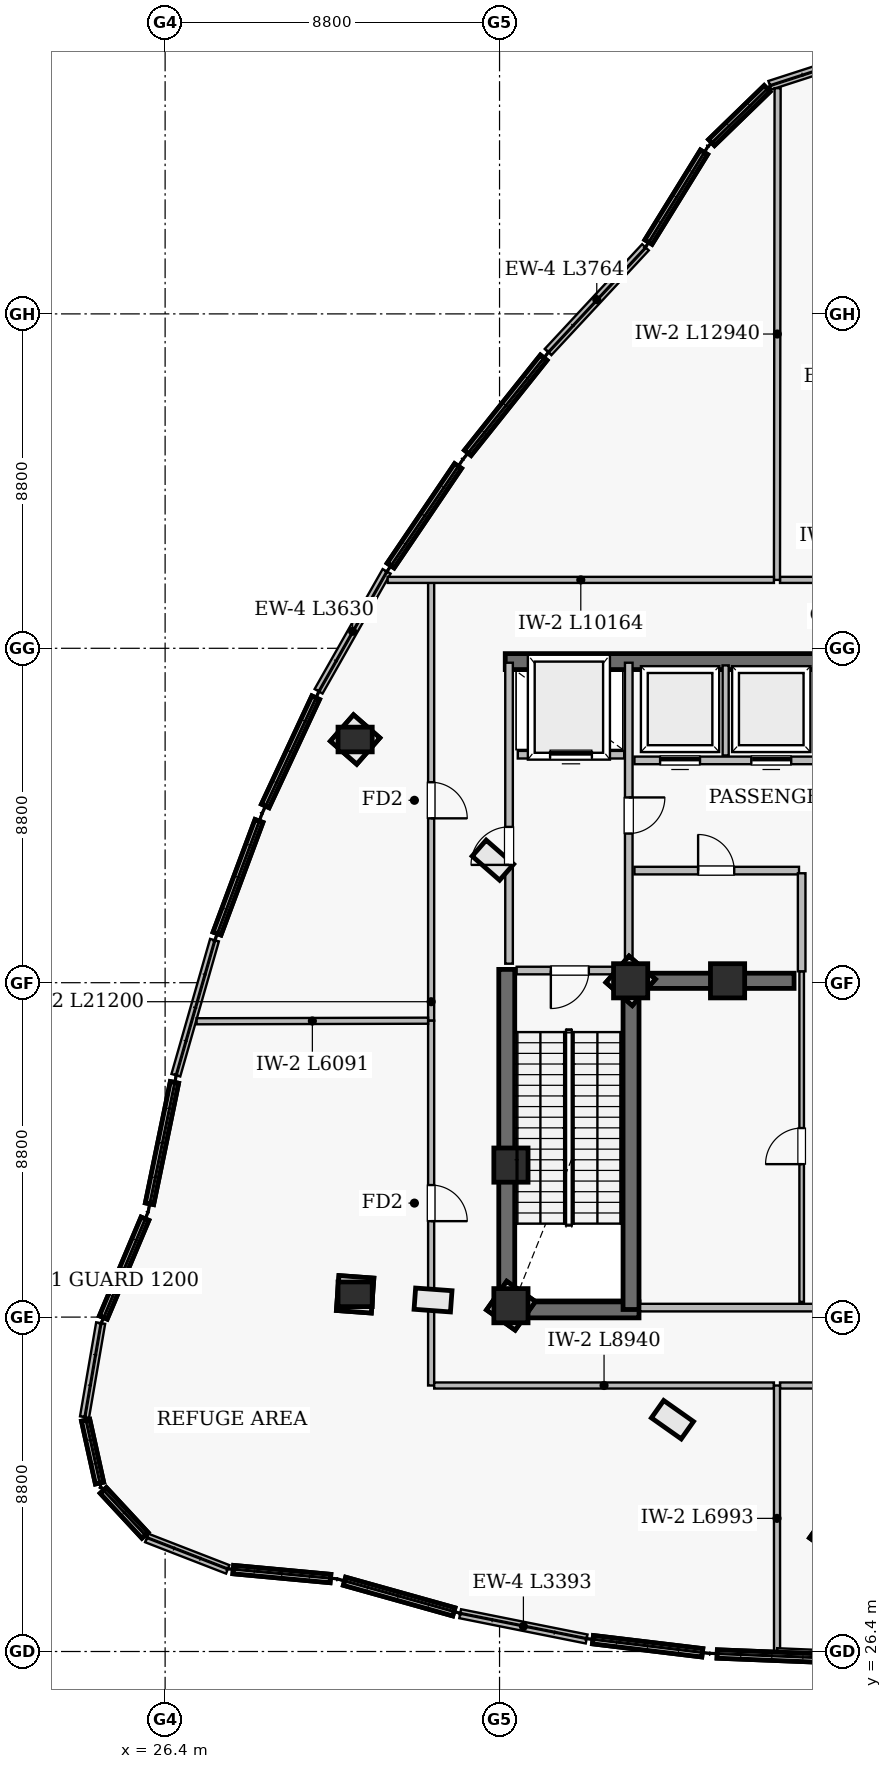
"""IFC4 building model, lengths in metres.
Left out: names, types, materials, properties, quantities, classifications, styles, units other than length and angle.
Written with IfcOpenShell. Run it as: python <this file> out.ifc"""

import sys

from ifc_helpers import new_model, si_unit, direction, frame, frame_2d, origin, origin_2d, place, context, subcontext, project, spatial, rectangle, extrude, element, fill, save


model = new_model("IFC4")
c1 = context("Model", 3, precision=1e-05, world=origin(), true_north=direction((0.0, 1.0)))
c2 = subcontext(c1, "Body", "Model", "MODEL_VIEW")
j1 = project(units=[si_unit("LENGTHUNIT", "METRE"), si_unit("PLANEANGLEUNIT", "RADIAN")], contexts=[c1])
p1 = place(None, origin())
s1 = spatial("IfcSite", under=j1, at=p1, CompositionType="ELEMENT")
p2 = place(p1, origin())
s2 = spatial("IfcBuilding", under=s1, at=p2, CompositionType="ELEMENT")
p3 = place(p2, frame((0.0, 0.0, 282.8)))
s3 = spatial("IfcBuildingStorey", under=s2, at=p3, CompositionType="ELEMENT", Elevation=282.8)
p4 = place(p3, frame((35.35, 52.45, 0.0), z_axis=(0.0, 0.0, 1.0), x_axis=(1.0, 0.0, 0.0)))
e1 = element("IfcWall", 1, at=p4, inside=s3, PredefinedType="SHEAR", context=c2, shape_type="SweptSolid", body=[
    extrude(rectangle(XDim=17.3, YDim=0.42, at=frame_2d((8.65, 0.0))), origin(), (0.0, 0.0, 1.0), 6.51),
])
p5 = place(p3, frame((35.18, 35.39, 0.0), z_axis=(0.0, 0.0, 1.0), x_axis=(1.0, 0.0, 0.0)))
e2 = element("IfcWall", 2, at=p5, inside=s3, PredefinedType="SHEAR", context=c2, shape_type="SweptSolid", body=[
    extrude(rectangle(XDim=3.69, YDim=0.42, at=frame_2d((1.845, 0.0))), origin(), (0.0, 0.0, 1.0), 6.51),
])
p6 = place(p3, frame((35.39, 35.18, 0.0), z_axis=(0.0, 0.0, 1.0), x_axis=(0.0, 1.0, 0.0)))
e3 = element("IfcWall", 3, at=p6, inside=s3, PredefinedType="SHEAR", context=c2, shape_type="SweptSolid", body=[
    extrude(rectangle(XDim=9.17, YDim=0.42, at=frame_2d((4.585, 0.0))), origin(), (0.0, 0.0, 1.0), 6.51),
])
p7 = place(p3, frame((38.66, 35.4, 0.0), z_axis=(0.0, 0.0, 1.0), x_axis=(0.0, 1.0, 0.0)))
e4 = element("IfcWall", 4, at=p7, inside=s3, PredefinedType="SHEAR", context=c2, shape_type="SweptSolid", body=[
    extrude(rectangle(XDim=8.95, YDim=0.42, at=frame_2d((4.475, 0.0))), origin(), (0.0, 0.0, 1.0), 6.51),
])
p8 = place(p3, frame((38.75, 44.05, 0.0), z_axis=(0.0, 0.0, 1.0), x_axis=(1.0, 0.0, 0.0)))
e5 = element("IfcWall", 5, at=p8, inside=s3, PredefinedType="SHEAR", context=c2, shape_type="SweptSolid", body=[
    extrude(rectangle(XDim=4.2, YDim=0.4, at=frame_2d((2.1, 0.0))), origin(), (0.0, 0.0, 1.0), 6.51),
])
for number, where, z_axis, x_axis in (
    (6, (35.5, 35.5, 0.0), (0.0, 0.0, 1.0), (1.0, 0.0, 0.0)),
    (7, (38.65, 44.05, 0.0), (0.0, 0.0, 1.0), (1.0, 0.0, 0.0)),
    (8, (35.5, 39.2, 0.0), (0.0, 0.0, 1.0), (1.0, 0.0, 0.0)),
    (9, (41.2, 44.05, 0.0), (0.0, 0.0, 1.0), (1.0, 0.0, 0.0)),
):
    element("IfcColumn", number, at=place(p3, frame(where, z_axis=z_axis, x_axis=x_axis)), inside=s3, PredefinedType="COLUMN", context=c2, shape_type="SweptSolid", body=[
        extrude(rectangle(XDim=0.9, YDim=0.9, at=origin_2d()), origin(), (0.0, 0.0, 1.0), 6.8),
    ])
for number, where, z_axis, x_axis in (
    (10, (31.4, 35.8, 0.0), (0.0, 0.0, 1.0), (1.0, 0.0, 0.0)),
    (11, (31.4, 50.4, 0.0), (0.0, 0.0, 1.0), (1.0, 0.0, 0.0)),
):
    element("IfcColumn", number, at=place(p3, frame(where, z_axis=z_axis, x_axis=x_axis)), inside=s3, PredefinedType="COLUMN", context=c2, shape_type="SweptSolid", body=[
        extrude(rectangle(XDim=0.9, YDim=0.65, at=origin_2d()), origin(), (0.0, 0.0, 1.0), 6.8),
    ])
p9 = place(p3, frame((44.029, 68.17, 0.0), z_axis=(0.0, 0.0, 1.0), x_axis=(-0.951512079285, -0.307611383039, 0.0)))
e12 = element("IfcWall", 12, at=p9, inside=s3, PredefinedType="SOLIDWALL", context=c2, shape_type="SweptSolid", body=[
    extrude(rectangle(XDim=1.805, YDim=0.24, at=frame_2d((0.902, 0.0))), origin(), (0.0, 0.0, 1.0), 6.51),
])
p10 = place(p3, frame((39.04, 63.353, 0.0), z_axis=(0.0, 0.0, 1.0), x_axis=(-0.680856477384, -0.732416860268, 0.0)))
e13 = element("IfcWall", 13, at=p10, inside=s3, PredefinedType="SOLIDWALL", context=c2, shape_type="SweptSolid", body=[
    extrude(rectangle(XDim=3.764, YDim=0.24, at=frame_2d((1.882, 0.0))), origin(), (0.0, 0.0, 1.0), 6.51),
])
p11 = place(p3, frame((32.229, 54.825, 0.0), z_axis=(0.0, 0.0, 1.0), x_axis=(-0.493333269889, -0.869840378932, 0.0)))
e14 = element("IfcWall", 14, at=p11, inside=s3, PredefinedType="SOLIDWALL", context=c2, shape_type="SweptSolid", body=[
    extrude(rectangle(XDim=3.63, YDim=0.24, at=frame_2d((1.815, 0.0))), origin(), (0.0, 0.0, 1.0), 6.51),
])
p12 = place(p3, frame((27.699, 45.12, 0.0), z_axis=(0.0, 0.0, 1.0), x_axis=(-0.27493040994, -0.961464128135, 0.0)))
e15 = element("IfcWall", 15, at=p12, inside=s3, PredefinedType="SOLIDWALL", context=c2, shape_type="SweptSolid", body=[
    extrude(rectangle(XDim=3.698, YDim=0.24, at=frame_2d((1.849, 0.0))), origin(), (0.0, 0.0, 1.0), 6.51),
])
p13 = place(p3, frame((24.704, 35.043, 0.0), z_axis=(0.0, 0.0, 1.0), x_axis=(-0.169379410238, -0.985550919733, 0.0)))
e16 = element("IfcWall", 16, at=p13, inside=s3, PredefinedType="SOLIDWALL", context=c2, shape_type="SweptSolid", body=[
    extrude(rectangle(XDim=2.511, YDim=0.24, at=frame_2d((1.255, 0.0))), origin(), (0.0, 0.0, 1.0), 6.51),
])
p14 = place(p3, frame((25.916, 29.388, 0.0), z_axis=(0.0, 0.0, 1.0), x_axis=(0.932278998154, -0.361740058053, 0.0)))
e17 = element("IfcWall", 17, at=p14, inside=s3, PredefinedType="SOLIDWALL", context=c2, shape_type="SweptSolid", body=[
    extrude(rectangle(XDim=2.286, YDim=0.24, at=frame_2d((1.143, 0.0))), origin(), (0.0, 0.0, 1.0), 6.51),
])
p15 = place(p3, frame((34.164, 27.395, 0.0), z_axis=(0.0, 0.0, 1.0), x_axis=(0.980580675691, -0.196116135138, 0.0)))
e18 = element("IfcWall", 18, at=p15, inside=s3, PredefinedType="SOLIDWALL", context=c2, shape_type="SweptSolid", body=[
    extrude(rectangle(XDim=3.394, YDim=0.24, at=frame_2d((1.697, 0.0))), origin(), (0.0, 0.0, 1.0), 6.51),
])
p16 = place(p3, frame((42.58, 33.4, 0.0), z_axis=(0.0, 0.0, 1.0), x_axis=(1.0, 0.0, 0.0)))
e19 = element("IfcWall", 19, at=p16, inside=s3, PredefinedType="SOLIDWALL", context=c2, shape_type="SweptSolid", body=[
    extrude(rectangle(XDim=11.94, YDim=0.16, at=frame_2d((5.97, 0.0))), origin(), (0.0, 0.0, 1.0), 5.798),
])
p17 = place(p16, frame((5.495, 0.0, 0.0)))
e20 = element("IfcOpeningElement", 20, at=p17, cuts=e19, PredefinedType="OPENING", context=c2, shape_type="SweptSolid", body=[
    extrude(rectangle(XDim=0.95, YDim=2.15, at=frame_2d((0.475, 1.075))), frame((0.0, 0.09, 0.0), z_axis=(0.0, -1.0, 0.0), x_axis=(1.0, 0.0, 0.0)), (0.0, 0.0, 1.0), 0.18),
])
p18 = place(p3, frame((33.4, 54.6, 0.0), z_axis=(0.0, 0.0, 1.0), x_axis=(0.0, -1.0, 0.0)))
e21 = element("IfcWall", 21, at=p18, inside=s3, PredefinedType="SOLIDWALL", context=c2, shape_type="SweptSolid", body=[
    extrude(rectangle(XDim=11.6, YDim=0.16, at=frame_2d((5.8, 0.0))), origin(), (0.0, 0.0, 1.0), 5.748),
])
p19 = place(p18, frame((5.325, 0.0, 0.0)))
e22 = element("IfcOpeningElement", 22, at=p19, cuts=e21, PredefinedType="OPENING", context=c2, shape_type="SweptSolid", body=[
    extrude(rectangle(XDim=0.95, YDim=2.15, at=frame_2d((0.475, 1.075))), frame((0.0, 0.09, 0.0), z_axis=(0.0, -1.0, 0.0), x_axis=(1.0, 0.0, 0.0)), (0.0, 0.0, 1.0), 0.18),
])
p20 = place(p3, frame((38.9, 35.45, 0.0), z_axis=(0.0, 0.0, 1.0), x_axis=(1.0, 0.0, 0.0)))
e23 = element("IfcWall", 23, at=p20, inside=s3, PredefinedType="SOLIDWALL", context=c2, shape_type="SweptSolid", body=[
    extrude(rectangle(XDim=10.2, YDim=0.2, at=frame_2d((5.1, 0.0))), origin(), (0.0, 0.0, 1.0), 6.51),
])
p21 = place(p20, frame((4.6, 0.0, 0.0)))
e24 = element("IfcOpeningElement", 24, at=p21, cuts=e23, PredefinedType="OPENING", context=c2, shape_type="SweptSolid", body=[
    extrude(rectangle(XDim=1.0, YDim=2.15, at=frame_2d((0.5, 1.075))), frame((0.0, 0.11, 0.0), z_axis=(0.0, -1.0, 0.0), x_axis=(1.0, 0.0, 0.0)), (0.0, 0.0, 1.0), 0.22),
])
p22 = place(p3, frame((52.47, 54.6, 0.0), z_axis=(0.0, 0.0, 1.0), x_axis=(-1.0, 0.0, 0.0)))
e25 = element("IfcWall", 25, at=p22, inside=s3, PredefinedType="SOLIDWALL", context=c2, shape_type="SweptSolid", body=[
    extrude(rectangle(XDim=9.89, YDim=0.16, at=frame_2d((4.945, 0.0))), origin(), (0.0, 0.0, 1.0), 5.798),
])
p23 = place(p22, frame((4.47, 0.0, 0.0)))
e26 = element("IfcOpeningElement", 26, at=p23, cuts=e25, PredefinedType="OPENING", context=c2, shape_type="SweptSolid", body=[
    extrude(rectangle(XDim=0.95, YDim=2.15, at=frame_2d((0.475, 1.075))), frame((0.0, 0.09, 0.0), z_axis=(0.0, -1.0, 0.0), x_axis=(1.0, 0.0, 0.0)), (0.0, 0.0, 1.0), 0.18),
])
p24 = place(p3, frame((33.4, 43.0, 0.0), z_axis=(0.0, 0.0, 1.0), x_axis=(0.0, -1.0, 0.0)))
e27 = element("IfcWall", 27, at=p24, inside=s3, PredefinedType="SOLIDWALL", context=c2, shape_type="SweptSolid", body=[
    extrude(rectangle(XDim=9.6, YDim=0.16, at=frame_2d((4.8, 0.0))), origin(), (0.0, 0.0, 1.0), 5.798),
])
p25 = place(p24, frame((4.325, 0.0, 0.0)))
e28 = element("IfcOpeningElement", 28, at=p25, cuts=e27, PredefinedType="OPENING", context=c2, shape_type="SweptSolid", body=[
    extrude(rectangle(XDim=0.95, YDim=2.15, at=frame_2d((0.475, 1.075))), frame((0.0, 0.09, 0.0), z_axis=(0.0, -1.0, 0.0), x_axis=(1.0, 0.0, 0.0)), (0.0, 0.0, 1.0), 0.18),
])
p26 = place(p3, frame((43.15, 35.6, 0.0), z_axis=(0.0, 0.0, 1.0), x_axis=(0.0, 1.0, 0.0)))
e29 = element("IfcWall", 29, at=p26, inside=s3, PredefinedType="PARTITIONING", context=c2, shape_type="SweptSolid", body=[
    extrude(rectangle(XDim=8.7, YDim=0.12, at=frame_2d((4.35, 0.0))), origin(), (0.0, 0.0, 1.0), 6.51),
])
p27 = place(p26, frame((3.625, 0.0, 0.0)))
e30 = element("IfcOpeningElement", 30, at=p27, cuts=e29, PredefinedType="OPENING", context=c2, shape_type="SweptSolid", body=[
    extrude(rectangle(XDim=0.95, YDim=2.1, at=frame_2d((0.475, 1.05))), frame((0.0, 0.07, 0.0), z_axis=(0.0, -1.0, 0.0), x_axis=(1.0, 0.0, 0.0)), (0.0, 0.0, 1.0), 0.14),
])
p28 = place(p3, frame((35.45, 44.5, 0.0), z_axis=(0.0, 0.0, 1.0), x_axis=(0.0, 1.0, 0.0)))
e31 = element("IfcWall", 31, at=p28, inside=s3, PredefinedType="SOLIDWALL", context=c2, shape_type="SweptSolid", body=[
    extrude(rectangle(XDim=7.92, YDim=0.2, at=frame_2d((3.96, 0.0))), origin(), (0.0, 0.0, 1.0), 6.51),
])
p29 = place(p28, frame((2.6, 0.0, 0.0)))
e32 = element("IfcOpeningElement", 32, at=p29, cuts=e31, PredefinedType="OPENING", context=c2, shape_type="SweptSolid", body=[
    extrude(rectangle(XDim=1.0, YDim=2.15, at=frame_2d((0.5, 1.075))), frame((0.0, 0.11, 0.0), z_axis=(0.0, -1.0, 0.0), x_axis=(1.0, 0.0, 0.0)), (0.0, 0.0, 1.0), 0.22),
])
p30 = place(p3, frame((38.6, 44.5, 0.0), z_axis=(0.0, 0.0, 1.0), x_axis=(0.0, 1.0, 0.0)))
e33 = element("IfcWall", 33, at=p30, inside=s3, PredefinedType="SOLIDWALL", context=c2, shape_type="SweptSolid", body=[
    extrude(rectangle(XDim=7.92, YDim=0.2, at=frame_2d((3.96, 0.0))), origin(), (0.0, 0.0, 1.0), 6.51),
])
p31 = place(p30, frame((3.425, 0.0, 0.0)))
e34 = element("IfcOpeningElement", 34, at=p31, cuts=e33, PredefinedType="OPENING", context=c2, shape_type="SweptSolid", body=[
    extrude(rectangle(XDim=0.95, YDim=2.15, at=frame_2d((0.475, 1.075))), frame((0.0, 0.11, 0.0), z_axis=(0.0, -1.0, 0.0), x_axis=(1.0, 0.0, 0.0)), (0.0, 0.0, 1.0), 0.22),
])
p32 = place(p3, frame((38.75, 49.85, 0.0), z_axis=(0.0, 0.0, 1.0), x_axis=(1.0, 0.0, 0.0)))
e35 = element("IfcWall", 35, at=p32, inside=s3, PredefinedType="SOLIDWALL", context=c2, shape_type="SweptSolid", body=[
    extrude(rectangle(XDim=5.5, YDim=0.2, at=frame_2d((2.75, 0.0))), origin(), (0.0, 0.0, 1.0), 6.51),
])
p33 = place(p32, frame((0.675, 0.0, 0.0)))
e36 = element("IfcOpeningElement", 36, at=p33, cuts=e35, PredefinedType="OPENING", context=c2, shape_type="SweptSolid", body=[
    extrude(rectangle(XDim=1.05, YDim=2.15, at=frame_2d((0.525, 1.075))), frame((0.0, 0.11, 0.0), z_axis=(0.0, -1.0, 0.0), x_axis=(1.0, 0.0, 0.0)), (0.0, 0.0, 1.0), 0.22),
])
p34 = place(p32, frame((3.075, 0.0, 0.0)))
e37 = element("IfcOpeningElement", 37, at=p34, cuts=e35, PredefinedType="OPENING", context=c2, shape_type="SweptSolid", body=[
    extrude(rectangle(XDim=1.05, YDim=2.15, at=frame_2d((0.525, 1.075))), frame((0.0, 0.11, 0.0), z_axis=(0.0, -1.0, 0.0), x_axis=(1.0, 0.0, 0.0)), (0.0, 0.0, 1.0), 0.22),
])
p35 = place(p3, frame((38.75, 46.95, 0.0), z_axis=(0.0, 0.0, 1.0), x_axis=(1.0, 0.0, 0.0)))
e38 = element("IfcWall", 38, at=p35, inside=s3, PredefinedType="SOLIDWALL", context=c2, shape_type="SweptSolid", body=[
    extrude(rectangle(XDim=4.33, YDim=0.2, at=frame_2d((2.165, 0.0))), origin(), (0.0, 0.0, 1.0), 6.51),
])
p36 = place(p35, frame((1.675, 0.0, 0.0)))
e39 = element("IfcOpeningElement", 39, at=p36, cuts=e38, PredefinedType="OPENING", context=c2, shape_type="SweptSolid", body=[
    extrude(rectangle(XDim=0.95, YDim=2.1, at=frame_2d((0.475, 1.05))), frame((0.0, 0.11, 0.0), z_axis=(0.0, -1.0, 0.0), x_axis=(1.0, 0.0, 0.0)), (0.0, 0.0, 1.0), 0.22),
])
p37 = place(p3, frame((35.65, 44.32, 0.0), z_axis=(0.0, 0.0, 1.0), x_axis=(1.0, 0.0, 0.0)))
e40 = element("IfcWall", 40, at=p37, inside=s3, PredefinedType="SOLIDWALL", context=c2, shape_type="SweptSolid", body=[
    extrude(rectangle(XDim=2.8, YDim=0.2, at=frame_2d((1.4, 0.0))), origin(), (0.0, 0.0, 1.0), 6.51),
])
p38 = place(p37, frame((0.9, 0.0, 0.0)))
e41 = element("IfcOpeningElement", 41, at=p38, cuts=e40, PredefinedType="OPENING", context=c2, shape_type="SweptSolid", body=[
    extrude(rectangle(XDim=1.0, YDim=2.15, at=frame_2d((0.5, 1.075))), frame((0.0, 0.11, 0.0), z_axis=(0.0, -1.0, 0.0), x_axis=(1.0, 0.0, 0.0)), (0.0, 0.0, 1.0), 0.22),
])
p39 = place(p3, frame((35.68, 50.0, 0.0), z_axis=(0.0, 0.0, 1.0), x_axis=(1.0, 0.0, 0.0)))
e42 = element("IfcWall", 42, at=p39, inside=s3, PredefinedType="SOLIDWALL", context=c2, shape_type="SweptSolid", body=[
    extrude(rectangle(XDim=2.8, YDim=0.2, at=frame_2d((1.4, 0.0))), origin(), (0.0, 0.0, 1.0), 6.51),
])
p40 = place(p39, frame((0.85, 0.0, 0.0)))
e43 = element("IfcOpeningElement", 43, at=p40, cuts=e42, PredefinedType="OPENING", context=c2, shape_type="SweptSolid", body=[
    extrude(rectangle(XDim=1.1, YDim=2.15, at=frame_2d((0.55, 1.075))), frame((0.0, 0.11, 0.0), z_axis=(0.0, -1.0, 0.0), x_axis=(1.0, 0.0, 0.0)), (0.0, 0.0, 1.0), 0.22),
])
p41 = place(p3, frame((42.5, 54.6, 0.0), z_axis=(0.0, 0.0, 1.0), x_axis=(0.001320703727, 0.99999912787, 0.0)))
e44 = element("IfcWall", 44, at=p41, inside=s3, PredefinedType="SOLIDWALL", context=c2, shape_type="SweptSolid", body=[
    extrude(rectangle(XDim=12.94, YDim=0.16, at=frame_2d((6.47, 0.0))), origin(), (0.0, 0.0, 1.0), 5.798),
])
p42 = place(p3, frame((42.42, 54.6, 0.0), z_axis=(0.0, 0.0, 1.0), x_axis=(-1.0, 0.0, 0.0)))
e45 = element("IfcWall", 45, at=p42, inside=s3, PredefinedType="SOLIDWALL", context=c2, shape_type="SweptSolid", body=[
    extrude(rectangle(XDim=10.164, YDim=0.16, at=frame_2d((5.082, 0.0))), origin(), (0.0, 0.0, 1.0), 5.798),
])
p43 = place(p3, frame((33.48, 33.4, 0.0), z_axis=(0.0, 0.0, 1.0), x_axis=(1.0, 0.0, 0.0)))
e46 = element("IfcWall", 46, at=p43, inside=s3, PredefinedType="SOLIDWALL", context=c2, shape_type="SweptSolid", body=[
    extrude(rectangle(XDim=8.94, YDim=0.16, at=frame_2d((4.47, 0.0))), origin(), (0.0, 0.0, 1.0), 5.798),
])
p44 = place(p3, frame((42.502, 26.407, 0.0), z_axis=(0.0, 0.0, 1.0), x_axis=(-0.000279300342, 0.999999960996, 0.0)))
e47 = element("IfcWall", 47, at=p44, inside=s3, PredefinedType="SOLIDWALL", context=c2, shape_type="SweptSolid", body=[
    extrude(rectangle(XDim=6.993, YDim=0.16, at=frame_2d((3.497, 0.0))), origin(), (0.0, 0.0, 1.0), 5.798),
])
p45 = place(p3, frame((33.32, 43.0, 0.0), z_axis=(0.0, 0.0, 1.0), x_axis=(-0.999997011031, -0.002444980467, 0.0)))
e48 = element("IfcWall", 48, at=p45, inside=s3, PredefinedType="SOLIDWALL", context=c2, shape_type="SweptSolid", body=[
    extrude(rectangle(XDim=6.091, YDim=0.16, at=frame_2d((3.045, 0.0))), origin(), (0.0, 0.0, 1.0), 5.798),
])
p46 = place(p3, frame((43.15, 44.3, 0.0), z_axis=(0.0, 0.0, 1.0), x_axis=(0.0, 1.0, 0.0)))
e49 = element("IfcWall", 49, at=p46, inside=s3, PredefinedType="SOLIDWALL", context=c2, shape_type="SweptSolid", body=[
    extrude(rectangle(XDim=2.58, YDim=0.2, at=frame_2d((1.29, 0.0))), origin(), (0.0, 0.0, 1.0), 6.51),
])
p47 = place(p3, frame((41.15, 49.98, 0.0), z_axis=(0.0, 0.0, 1.0), x_axis=(0.0, 1.0, 0.0)))
e50 = element("IfcWall", 50, at=p47, inside=s3, PredefinedType="SOLIDWALL", context=c2, shape_type="SweptSolid", body=[
    extrude(rectangle(XDim=2.37, YDim=0.16, at=frame_2d((1.185, 0.0))), origin(), (0.0, 0.0, 1.0), 6.51),
])
p48 = place(p3, frame((42.502, 26.407, 0.0), z_axis=(0.0, 0.0, 1.0), x_axis=(0.999108795234, -0.042209184862, 0.0)))
e51 = element("IfcWall", 51, at=p48, inside=s3, PredefinedType="SOLIDWALL", context=c2, shape_type="SweptSolid", body=[
    extrude(rectangle(XDim=1.544, YDim=0.16, at=frame_2d((0.772, 0.0))), origin(), (0.0, 0.0, 1.0), 6.51),
])
p49 = place(p38, frame((1.0, 0.0, 0.0), z_axis=(0.0, 0.0, 1.0), x_axis=(-1.0, 0.0, 0.0)))
e52 = element("IfcDoor", 52, at=p49, inside=s3, OperationType="SINGLE_SWING_LEFT", PredefinedType="DOOR", context=c2, shape_type="SweptSolid", body=[
    extrude(rectangle(XDim=1.0, YDim=2.15, at=frame_2d((0.5, 1.075))), frame((0.0, 0.025, 0.0), z_axis=(0.0, -1.0, 0.0), x_axis=(1.0, 0.0, 0.0)), (0.0, 0.0, 1.0), 0.05),
])
fill(e41, e52)
p50 = place(p29, origin())
e53 = element("IfcDoor", 53, at=p50, inside=s3, OperationType="SINGLE_SWING_LEFT", PredefinedType="DOOR", context=c2, shape_type="SweptSolid", body=[
    extrude(rectangle(XDim=1.0, YDim=2.15, at=frame_2d((0.5, 1.075))), frame((0.0, 0.025, 0.0), z_axis=(0.0, -1.0, 0.0), x_axis=(1.0, 0.0, 0.0)), (0.0, 0.0, 1.0), 0.05),
])
fill(e32, e53)
p51 = place(p31, frame((0.95, 0.0, 0.0), z_axis=(0.0, 0.0, 1.0), x_axis=(-1.0, 0.0, 0.0)))
e54 = element("IfcDoor", 54, at=p51, inside=s3, OperationType="SINGLE_SWING_RIGHT", PredefinedType="DOOR", context=c2, shape_type="SweptSolid", body=[
    extrude(rectangle(XDim=0.95, YDim=2.15, at=frame_2d((0.475, 1.075))), frame((0.0, 0.025, 0.0), z_axis=(0.0, -1.0, 0.0), x_axis=(1.0, 0.0, 0.0)), (0.0, 0.0, 1.0), 0.05),
])
fill(e34, e54)
p52 = place(p40, origin())
e55 = element("IfcDoor", 55, at=p52, inside=s3, OperationType="SLIDING_TO_LEFT", PredefinedType="DOOR", context=c2, shape_type="SweptSolid", body=[
    extrude(rectangle(XDim=1.1, YDim=2.15, at=frame_2d((0.55, 1.075))), frame((0.0, 0.025, 0.0), z_axis=(0.0, -1.0, 0.0), x_axis=(1.0, 0.0, 0.0)), (0.0, 0.0, 1.0), 0.05),
])
fill(e43, e55)
p53 = place(p33, origin())
e56 = element("IfcDoor", 56, at=p53, inside=s3, OperationType="SLIDING_TO_LEFT", PredefinedType="DOOR", context=c2, shape_type="SweptSolid", body=[
    extrude(rectangle(XDim=1.05, YDim=2.15, at=frame_2d((0.525, 1.075))), frame((0.0, 0.025, 0.0), z_axis=(0.0, -1.0, 0.0), x_axis=(1.0, 0.0, 0.0)), (0.0, 0.0, 1.0), 0.05),
])
fill(e36, e56)
p54 = place(p34, origin())
e57 = element("IfcDoor", 57, at=p54, inside=s3, OperationType="SLIDING_TO_LEFT", PredefinedType="DOOR", context=c2, shape_type="SweptSolid", body=[
    extrude(rectangle(XDim=1.05, YDim=2.15, at=frame_2d((0.525, 1.075))), frame((0.0, 0.025, 0.0), z_axis=(0.0, -1.0, 0.0), x_axis=(1.0, 0.0, 0.0)), (0.0, 0.0, 1.0), 0.05),
])
fill(e37, e57)
p55 = place(p36, origin())
e58 = element("IfcDoor", 58, at=p55, inside=s3, OperationType="SINGLE_SWING_LEFT", PredefinedType="DOOR", context=c2, shape_type="SweptSolid", body=[
    extrude(rectangle(XDim=0.95, YDim=2.1, at=frame_2d((0.475, 1.05))), frame((0.0, 0.025, 0.0), z_axis=(0.0, -1.0, 0.0), x_axis=(1.0, 0.0, 0.0)), (0.0, 0.0, 1.0), 0.05),
])
fill(e39, e58)
p56 = place(p27, origin())
e59 = element("IfcDoor", 59, at=p56, inside=s3, OperationType="SINGLE_SWING_LEFT", PredefinedType="DOOR", context=c2, shape_type="SweptSolid", body=[
    extrude(rectangle(XDim=0.95, YDim=2.1, at=frame_2d((0.475, 1.05))), frame((0.0, 0.025, 0.0), z_axis=(0.0, -1.0, 0.0), x_axis=(1.0, 0.0, 0.0)), (0.0, 0.0, 1.0), 0.05),
])
fill(e30, e59)
p57 = place(p25, origin())
e60 = element("IfcDoor", 60, at=p57, inside=s3, OperationType="SINGLE_SWING_RIGHT", PredefinedType="DOOR", context=c2, shape_type="SweptSolid", body=[
    extrude(rectangle(XDim=0.95, YDim=2.15, at=frame_2d((0.475, 1.075))), frame((0.0, 0.025, 0.0), z_axis=(0.0, -1.0, 0.0), x_axis=(1.0, 0.0, 0.0)), (0.0, 0.0, 1.0), 0.05),
])
fill(e28, e60)
p58 = place(p19, origin())
e61 = element("IfcDoor", 61, at=p58, inside=s3, OperationType="SINGLE_SWING_RIGHT", PredefinedType="DOOR", context=c2, shape_type="SweptSolid", body=[
    extrude(rectangle(XDim=0.95, YDim=2.15, at=frame_2d((0.475, 1.075))), frame((0.0, 0.025, 0.0), z_axis=(0.0, -1.0, 0.0), x_axis=(1.0, 0.0, 0.0)), (0.0, 0.0, 1.0), 0.05),
])
fill(e22, e61)
save(model, sys.argv[1])
